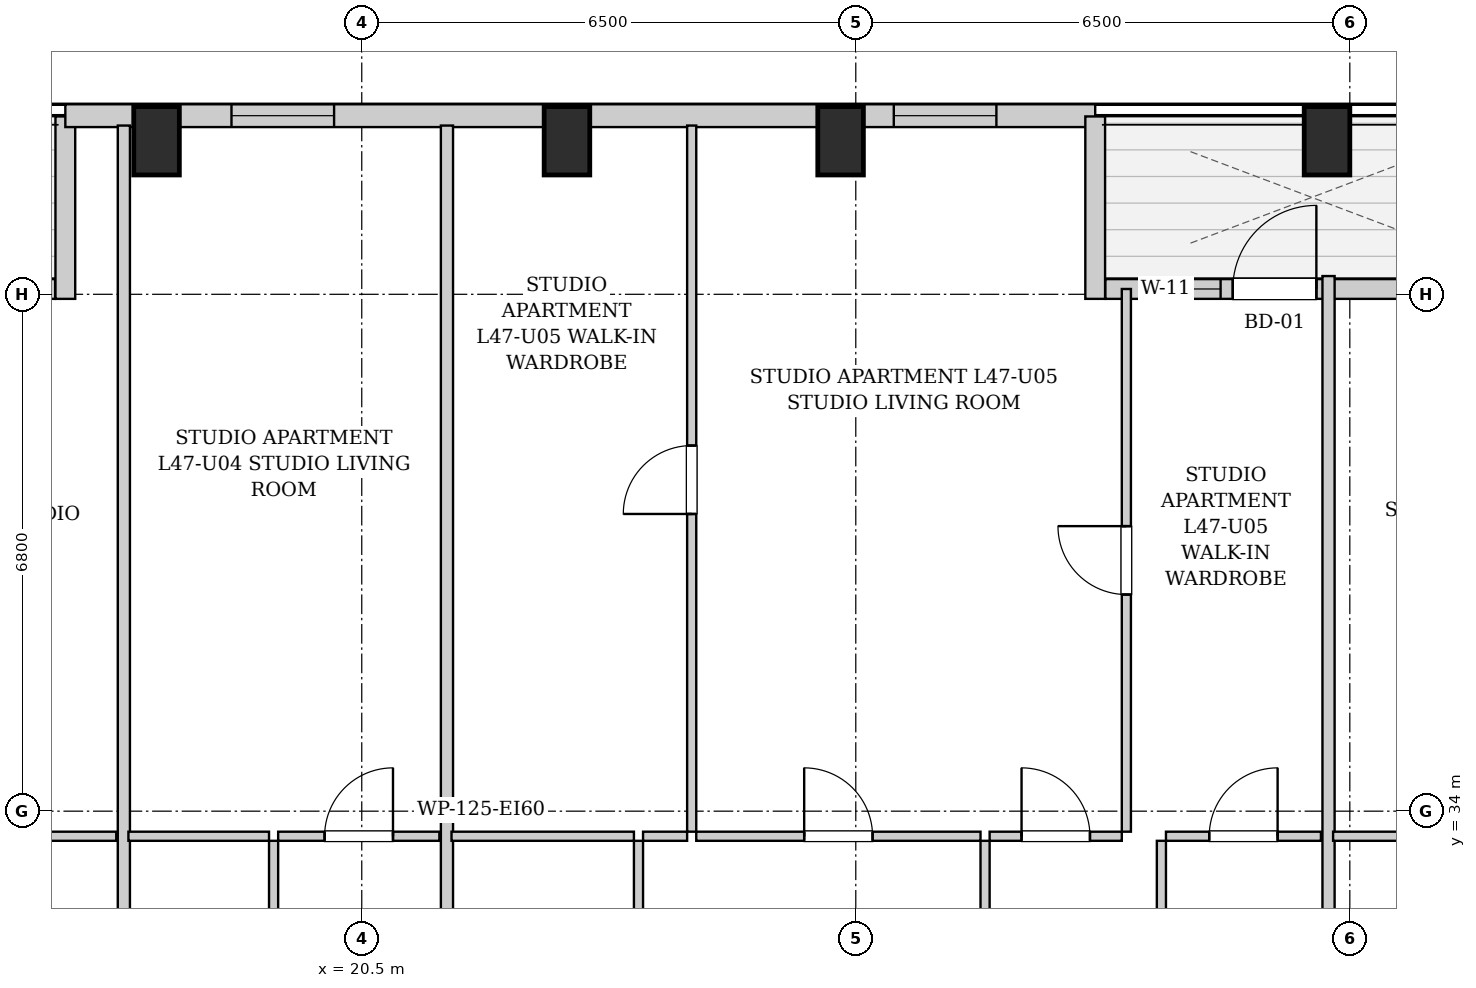
"""IFC4 building model, lengths in metres.
Left out: names, types, materials, properties, quantities, classifications, styles, units other than length and angle.
Written with IfcOpenShell. Run it as: python <this file> out.ifc"""

import sys

from ifc_helpers import new_model, si_unit, direction, frame, frame_2d, origin, origin_2d, place, context, subcontext, project, spatial, rectangle, extrude, element, fill, save


model = new_model("IFC4")
c1 = context("Model", 3, precision=1e-05, world=origin(), true_north=direction((0.0, 1.0)))
c2 = subcontext(c1, "Body", "Model", "MODEL_VIEW")
j1 = project(units=[si_unit("LENGTHUNIT", "METRE"), si_unit("PLANEANGLEUNIT", "RADIAN")], contexts=[c1])
p1 = place(None, origin())
s1 = spatial("IfcSite", under=j1, at=p1, CompositionType="ELEMENT")
p2 = place(p1, origin())
s2 = spatial("IfcBuilding", under=s1, at=p2, CompositionType="ELEMENT")
p3 = place(p2, frame((0.0, 0.0, 163.4)))
s3 = spatial("IfcBuildingStorey", under=s2, at=p3, CompositionType="ELEMENT", Elevation=163.4)
for number, where, z_axis, x_axis in (
    (1, (17.8, 42.82, 0.0), (0.0, 0.0, 1.0), (1.0, 0.0, 0.0)),
    (2, (23.2, 42.82, 0.0), (0.0, 0.0, 1.0), (1.0, 0.0, 0.0)),
    (3, (26.8, 42.82, 0.0), (0.0, 0.0, 1.0), (1.0, 0.0, 0.0)),
    (4, (33.2, 42.82, 0.0), (0.0, 0.0, 1.0), (1.0, 0.0, 0.0)),
):
    element("IfcColumn", number, at=place(p3, frame(where, z_axis=z_axis, x_axis=x_axis)), inside=s3, PredefinedType="COLUMN", context=c2, shape_type="SweptSolid", body=[
        extrude(rectangle(XDim=0.6, YDim=0.9, at=origin_2d()), origin(), (0.0, 0.0, 1.0), 3.25),
    ])
p4 = place(p3, frame((11.434, 40.87, 0.0), z_axis=(0.0, 0.0, 1.0), x_axis=(1.0, 0.0, 0.0)))
e5 = element("IfcWall", 5, at=p4, inside=s3, PredefinedType="SOLIDWALL", context=c2, shape_type="SweptSolid", body=[
    extrude(rectangle(XDim=5.032, YDim=0.26, at=frame_2d((2.516, 0.0))), origin(), (0.0, 0.0, 1.0), 2.99),
])
p5 = place(p4, frame((1.966, 0.0, 0.0)))
e6 = element("IfcOpeningElement", 6, at=p5, cuts=e5, PredefinedType="OPENING", context=c2, shape_type="SweptSolid", body=[
    extrude(rectangle(XDim=1.1, YDim=2.0, at=frame_2d((0.55, 1.0))), frame((0.0, 0.14, 0.0), z_axis=(0.0, -1.0, 0.0), x_axis=(1.0, 0.0, 0.0)), (0.0, 0.0, 1.0), 0.28),
])
p6 = place(p4, frame((3.326, 0.0, 0.85)))
e7 = element("IfcOpeningElement", 7, at=p6, cuts=e5, PredefinedType="OPENING", context=c2, shape_type="SweptSolid", body=[
    extrude(rectangle(XDim=1.35, YDim=1.65, at=frame_2d((0.675, 0.825))), frame((0.0, 0.14, 0.0), z_axis=(0.0, -1.0, 0.0), x_axis=(1.0, 0.0, 0.0)), (0.0, 0.0, 1.0), 0.28),
])
p7 = place(p3, frame((16.6, 40.74, 0.0), z_axis=(0.0, 0.0, 1.0), x_axis=(0.0, 1.0, 0.0)))
e8 = element("IfcWall", 8, at=p7, inside=s3, PredefinedType="SOLIDWALL", context=c2, shape_type="SweptSolid", body=[
    extrude(rectangle(XDim=2.4, YDim=0.26, at=frame_2d((1.2, 0.0))), origin(), (0.0, 0.0, 1.0), 2.99),
])
p8 = place(p3, frame((16.6, 43.15, 0.0), z_axis=(0.0, 0.0, 1.0), x_axis=(1.0, 0.0, 0.0)))
e9 = element("IfcWall", 9, at=p8, inside=s3, PredefinedType="SOLIDWALL", context=c2, shape_type="SweptSolid", body=[
    extrude(rectangle(XDim=13.55, YDim=0.3, at=frame_2d((6.775, 0.0))), origin(), (0.0, 0.0, 1.0), 2.99),
])
p9 = place(p8, frame((2.186, 0.0, 0.55)))
e10 = element("IfcOpeningElement", 10, at=p9, cuts=e9, PredefinedType="OPENING", context=c2, shape_type="SweptSolid", body=[
    extrude(rectangle(XDim=1.35, YDim=1.2, at=frame_2d((0.675, 0.6))), frame((0.0, 0.16, 0.0), z_axis=(0.0, -1.0, 0.0), x_axis=(1.0, 0.0, 0.0)), (0.0, 0.0, 1.0), 0.32),
])
p10 = place(p8, frame((10.9, 0.0, 0.55)))
e11 = element("IfcOpeningElement", 11, at=p10, cuts=e9, PredefinedType="OPENING", context=c2, shape_type="SweptSolid", body=[
    extrude(rectangle(XDim=1.35, YDim=1.2, at=frame_2d((0.675, 0.6))), frame((0.0, 0.16, 0.0), z_axis=(0.0, -1.0, 0.0), x_axis=(1.0, 0.0, 0.0)), (0.0, 0.0, 1.0), 0.32),
])
p11 = place(p3, frame((30.15, 43.14, 0.0), z_axis=(0.0, 0.0, 1.0), x_axis=(0.0, -1.0, 0.0)))
e12 = element("IfcWall", 12, at=p11, inside=s3, PredefinedType="SOLIDWALL", context=c2, shape_type="SweptSolid", body=[
    extrude(rectangle(XDim=2.4, YDim=0.26, at=frame_2d((1.2, 0.0))), origin(), (0.0, 0.0, 1.0), 2.99),
])
p12 = place(p3, frame((30.284, 40.87, 0.0), z_axis=(0.0, 0.0, 1.0), x_axis=(1.0, 0.0, 0.0)))
e13 = element("IfcWall", 13, at=p12, inside=s3, PredefinedType="SOLIDWALL", context=c2, shape_type="SweptSolid", body=[
    extrude(rectangle(XDim=5.432, YDim=0.26, at=frame_2d((2.716, 0.0))), origin(), (0.0, 0.0, 1.0), 2.99),
])
p13 = place(p12, frame((1.676, 0.0, 0.0)))
e14 = element("IfcOpeningElement", 14, at=p13, cuts=e13, PredefinedType="OPENING", context=c2, shape_type="SweptSolid", body=[
    extrude(rectangle(XDim=1.1, YDim=2.0, at=frame_2d((0.55, 1.0))), frame((0.0, 0.14, 0.0), z_axis=(0.0, -1.0, 0.0), x_axis=(1.0, 0.0, 0.0)), (0.0, 0.0, 1.0), 0.28),
])
p14 = place(p12, frame((0.666, 0.0, 0.55)))
e15 = element("IfcOpeningElement", 15, at=p14, cuts=e13, PredefinedType="OPENING", context=c2, shape_type="SweptSolid", body=[
    extrude(rectangle(XDim=0.85, YDim=1.2, at=frame_2d((0.425, 0.6))), frame((0.0, 0.14, 0.0), z_axis=(0.0, -1.0, 0.0), x_axis=(1.0, 0.0, 0.0)), (0.0, 0.0, 1.0), 0.28),
])
p15 = place(p3, frame((12.357, 33.67, 0.0), z_axis=(0.0, 0.0, 1.0), x_axis=(1.0, 0.0, 0.0)))
e16 = element("IfcWall", 16, at=p15, inside=s3, PredefinedType="PARTITIONING", context=c2, shape_type="SweptSolid", body=[
    extrude(rectangle(XDim=4.913, YDim=0.12, at=frame_2d((2.457, 0.0))), origin(), (0.0, 0.0, 1.0), 2.99),
])
p16 = place(p15, frame((2.006, 0.0, 0.0)))
e17 = element("IfcOpeningElement", 17, at=p16, cuts=e16, PredefinedType="OPENING", context=c2, shape_type="SweptSolid", body=[
    extrude(rectangle(XDim=0.9, YDim=2.05, at=frame_2d((0.45, 1.025))), frame((0.0, 0.07, 0.0), z_axis=(0.0, -1.0, 0.0), x_axis=(1.0, 0.0, 0.0)), (0.0, 0.0, 1.0), 0.14),
])
p17 = place(p3, frame((17.37, 30.76, 0.0), z_axis=(0.0, 0.0, 1.0), x_axis=(0.0, 1.0, 0.0)))
e18 = element("IfcWall", 18, at=p17, inside=s3, PredefinedType="PARTITIONING", context=c2, shape_type="SweptSolid", body=[
    extrude(rectangle(XDim=12.26, YDim=0.16, at=frame_2d((6.13, 0.0))), origin(), (0.0, 0.0, 1.0), 2.99),
])
p18 = place(p3, frame((19.34, 30.76, 0.0), z_axis=(0.0, 0.0, 1.0), x_axis=(0.0, 1.0, 0.0)))
e19 = element("IfcWall", 19, at=p18, inside=s3, PredefinedType="PARTITIONING", context=c2, shape_type="SweptSolid", body=[
    extrude(rectangle(XDim=2.85, YDim=0.12, at=frame_2d((1.425, 0.0))), origin(), (0.0, 0.0, 1.0), 2.99),
])
p19 = place(p18, frame((0.995, 0.0, 0.0)))
e20 = element("IfcOpeningElement", 20, at=p19, cuts=e19, PredefinedType="OPENING", context=c2, shape_type="SweptSolid", body=[
    extrude(rectangle(XDim=0.86, YDim=2.05, at=frame_2d((0.43, 1.025))), frame((0.0, 0.07, 0.0), z_axis=(0.0, -1.0, 0.0), x_axis=(1.0, 0.0, 0.0)), (0.0, 0.0, 1.0), 0.14),
])
p20 = place(p3, frame((17.43, 33.67, 0.0), z_axis=(0.0, 0.0, 1.0), x_axis=(1.0, 0.0, 0.0)))
e21 = element("IfcWall", 21, at=p20, inside=s3, PredefinedType="PARTITIONING", context=c2, shape_type="SweptSolid", body=[
    extrude(rectangle(XDim=1.85, YDim=0.12, at=frame_2d((0.925, 0.0))), origin(), (0.0, 0.0, 1.0), 2.99),
])
p21 = place(p3, frame((19.4, 33.67, 0.0), z_axis=(0.0, 0.0, 1.0), x_axis=(1.0, 0.0, 0.0)))
e22 = element("IfcWall", 22, at=p21, inside=s3, PredefinedType="PARTITIONING", context=c2, shape_type="SweptSolid", body=[
    extrude(rectangle(XDim=2.121, YDim=0.12, at=frame_2d((1.061, 0.0))), origin(), (0.0, 0.0, 1.0), 2.99),
])
p22 = place(p21, frame((0.611, 0.0, 0.0)))
e23 = element("IfcOpeningElement", 23, at=p22, cuts=e22, PredefinedType="OPENING", context=c2, shape_type="SweptSolid", body=[
    extrude(rectangle(XDim=0.9, YDim=2.05, at=frame_2d((0.45, 1.025))), frame((0.0, 0.07, 0.0), z_axis=(0.0, -1.0, 0.0), x_axis=(1.0, 0.0, 0.0)), (0.0, 0.0, 1.0), 0.14),
])
p23 = place(p3, frame((21.621, 30.76, 0.0), z_axis=(0.0, 0.0, 1.0), x_axis=(0.0, 1.0, 0.0)))
e24 = element("IfcWall", 24, at=p23, inside=s3, PredefinedType="PARTITIONING", context=c2, shape_type="SweptSolid", body=[
    extrude(rectangle(XDim=12.26, YDim=0.16, at=frame_2d((6.13, 0.0))), origin(), (0.0, 0.0, 1.0), 2.99),
])
p24 = place(p3, frame((24.141, 30.76, 0.0), z_axis=(0.0, 0.0, 1.0), x_axis=(0.0, 1.0, 0.0)))
e25 = element("IfcWall", 25, at=p24, inside=s3, PredefinedType="PARTITIONING", context=c2, shape_type="SweptSolid", body=[
    extrude(rectangle(XDim=2.85, YDim=0.12, at=frame_2d((1.425, 0.0))), origin(), (0.0, 0.0, 1.0), 2.99),
])
p25 = place(p24, frame((0.995, 0.0, 0.0)))
e26 = element("IfcOpeningElement", 26, at=p25, cuts=e25, PredefinedType="OPENING", context=c2, shape_type="SweptSolid", body=[
    extrude(rectangle(XDim=0.86, YDim=2.05, at=frame_2d((0.43, 1.025))), frame((0.0, 0.07, 0.0), z_axis=(0.0, -1.0, 0.0), x_axis=(1.0, 0.0, 0.0)), (0.0, 0.0, 1.0), 0.14),
])
p26 = place(p3, frame((21.681, 33.67, 0.0), z_axis=(0.0, 0.0, 1.0), x_axis=(1.0, 0.0, 0.0)))
e27 = element("IfcWall", 27, at=p26, inside=s3, PredefinedType="PARTITIONING", context=c2, shape_type="SweptSolid", body=[
    extrude(rectangle(XDim=2.4, YDim=0.12, at=frame_2d((1.2, 0.0))), origin(), (0.0, 0.0, 1.0), 2.99),
])
p27 = place(p3, frame((28.701, 30.76, 0.0), z_axis=(0.0, 0.0, 1.0), x_axis=(0.0, 1.0, 0.0)))
e28 = element("IfcWall", 28, at=p27, inside=s3, PredefinedType="PARTITIONING", context=c2, shape_type="SweptSolid", body=[
    extrude(rectangle(XDim=2.85, YDim=0.12, at=frame_2d((1.425, 0.0))), origin(), (0.0, 0.0, 1.0), 2.99),
])
p28 = place(p27, frame((0.975, 0.0, 0.0)))
e29 = element("IfcOpeningElement", 29, at=p28, cuts=e28, PredefinedType="OPENING", context=c2, shape_type="SweptSolid", body=[
    extrude(rectangle(XDim=0.9, YDim=2.05, at=frame_2d((0.45, 1.025))), frame((0.0, 0.07, 0.0), z_axis=(0.0, -1.0, 0.0), x_axis=(1.0, 0.0, 0.0)), (0.0, 0.0, 1.0), 0.14),
])
p29 = place(p3, frame((24.201, 33.67, 0.0), z_axis=(0.0, 0.0, 1.0), x_axis=(1.0, 0.0, 0.0)))
e30 = element("IfcWall", 30, at=p29, inside=s3, PredefinedType="PARTITIONING", context=c2, shape_type="SweptSolid", body=[
    extrude(rectangle(XDim=0.58, YDim=0.12, at=frame_2d((0.29, 0.0))), origin(), (0.0, 0.0, 1.0), 2.99),
])
p30 = place(p3, frame((24.901, 33.67, 0.0), z_axis=(0.0, 0.0, 1.0), x_axis=(1.0, 0.0, 0.0)))
e31 = element("IfcWall", 31, at=p30, inside=s3, PredefinedType="PARTITIONING", context=c2, shape_type="SweptSolid", body=[
    extrude(rectangle(XDim=3.74, YDim=0.12, at=frame_2d((1.87, 0.0))), origin(), (0.0, 0.0, 1.0), 2.99),
])
p31 = place(p30, frame((1.42, 0.0, 0.0)))
e32 = element("IfcOpeningElement", 32, at=p31, cuts=e31, PredefinedType="OPENING", context=c2, shape_type="SweptSolid", body=[
    extrude(rectangle(XDim=0.9, YDim=2.05, at=frame_2d((0.45, 1.025))), frame((0.0, 0.07, 0.0), z_axis=(0.0, -1.0, 0.0), x_axis=(1.0, 0.0, 0.0)), (0.0, 0.0, 1.0), 0.14),
])
p32 = place(p3, frame((31.021, 30.76, 0.0), z_axis=(0.0, 0.0, 1.0), x_axis=(0.0, 1.0, 0.0)))
e33 = element("IfcWall", 33, at=p32, inside=s3, PredefinedType="PARTITIONING", context=c2, shape_type="SweptSolid", body=[
    extrude(rectangle(XDim=2.85, YDim=0.12, at=frame_2d((1.425, 0.0))), origin(), (0.0, 0.0, 1.0), 2.99),
])
p33 = place(p32, frame((0.975, 0.0, 0.0)))
e34 = element("IfcOpeningElement", 34, at=p33, cuts=e33, PredefinedType="OPENING", context=c2, shape_type="SweptSolid", body=[
    extrude(rectangle(XDim=0.9, YDim=2.05, at=frame_2d((0.45, 1.025))), frame((0.0, 0.07, 0.0), z_axis=(0.0, -1.0, 0.0), x_axis=(1.0, 0.0, 0.0)), (0.0, 0.0, 1.0), 0.14),
])
p34 = place(p3, frame((28.761, 33.67, 0.0), z_axis=(0.0, 0.0, 1.0), x_axis=(1.0, 0.0, 0.0)))
e35 = element("IfcWall", 35, at=p34, inside=s3, PredefinedType="PARTITIONING", context=c2, shape_type="SweptSolid", body=[
    extrude(rectangle(XDim=1.739, YDim=0.12, at=frame_2d((0.87, 0.0))), origin(), (0.0, 0.0, 1.0), 2.99),
])
p35 = place(p34, frame((0.42, 0.0, 0.0)))
e36 = element("IfcOpeningElement", 36, at=p35, cuts=e35, PredefinedType="OPENING", context=c2, shape_type="SweptSolid", body=[
    extrude(rectangle(XDim=0.9, YDim=2.05, at=frame_2d((0.45, 1.025))), frame((0.0, 0.07, 0.0), z_axis=(0.0, -1.0, 0.0), x_axis=(1.0, 0.0, 0.0)), (0.0, 0.0, 1.0), 0.14),
])
p36 = place(p3, frame((31.081, 33.67, 0.0), z_axis=(0.0, 0.0, 1.0), x_axis=(1.0, 0.0, 0.0)))
e37 = element("IfcWall", 37, at=p36, inside=s3, PredefinedType="PARTITIONING", context=c2, shape_type="SweptSolid", body=[
    extrude(rectangle(XDim=2.039, YDim=0.12, at=frame_2d((1.02, 0.0))), origin(), (0.0, 0.0, 1.0), 2.99),
])
p37 = place(p36, frame((0.569, 0.0, 0.0)))
e38 = element("IfcOpeningElement", 38, at=p37, cuts=e37, PredefinedType="OPENING", context=c2, shape_type="SweptSolid", body=[
    extrude(rectangle(XDim=0.9, YDim=2.05, at=frame_2d((0.45, 1.025))), frame((0.0, 0.07, 0.0), z_axis=(0.0, -1.0, 0.0), x_axis=(1.0, 0.0, 0.0)), (0.0, 0.0, 1.0), 0.14),
])
p38 = place(p3, frame((24.841, 33.73, 0.0), z_axis=(0.0, 0.0, 1.0), x_axis=(0.0, 1.0, 0.0)))
e39 = element("IfcWall", 39, at=p38, inside=s3, PredefinedType="PARTITIONING", context=c2, shape_type="SweptSolid", body=[
    extrude(rectangle(XDim=9.29, YDim=0.12, at=frame_2d((4.645, 0.0))), origin(), (0.0, 0.0, 1.0), 2.99),
])
p39 = place(p38, frame((4.18, 0.0, 0.0)))
e40 = element("IfcOpeningElement", 40, at=p39, cuts=e39, PredefinedType="OPENING", context=c2, shape_type="SweptSolid", body=[
    extrude(rectangle(XDim=0.9, YDim=2.05, at=frame_2d((0.45, 1.025))), frame((0.0, 0.07, 0.0), z_axis=(0.0, -1.0, 0.0), x_axis=(1.0, 0.0, 0.0)), (0.0, 0.0, 1.0), 0.14),
])
p40 = place(p3, frame((30.56, 33.73, 0.0), z_axis=(0.0, 0.0, 1.0), x_axis=(0.0, 1.0, 0.0)))
e41 = element("IfcWall", 41, at=p40, inside=s3, PredefinedType="PARTITIONING", context=c2, shape_type="SweptSolid", body=[
    extrude(rectangle(XDim=7.14, YDim=0.12, at=frame_2d((3.57, 0.0))), origin(), (0.0, 0.0, 1.0), 2.99),
])
p41 = place(p40, frame((3.12, 0.0, 0.0)))
e42 = element("IfcOpeningElement", 42, at=p41, cuts=e41, PredefinedType="OPENING", context=c2, shape_type="SweptSolid", body=[
    extrude(rectangle(XDim=0.9, YDim=2.05, at=frame_2d((0.45, 1.025))), frame((0.0, 0.07, 0.0), z_axis=(0.0, -1.0, 0.0), x_axis=(1.0, 0.0, 0.0)), (0.0, 0.0, 1.0), 0.14),
])
p42 = place(p3, frame((33.22, 30.76, 0.0), z_axis=(0.0, 0.0, 1.0), x_axis=(0.0, 1.0, 0.0)))
e43 = element("IfcWall", 43, at=p42, inside=s3, PredefinedType="PARTITIONING", context=c2, shape_type="SweptSolid", body=[
    extrude(rectangle(XDim=10.28, YDim=0.16, at=frame_2d((5.14, 0.0))), origin(), (0.0, 0.0, 1.0), 2.442),
])
p43 = place(p3, frame((33.28, 33.67, 0.0), z_axis=(0.0, 0.0, 1.0), x_axis=(1.0, 0.0, 0.0)))
e44 = element("IfcWall", 44, at=p43, inside=s3, PredefinedType="PARTITIONING", context=c2, shape_type="SweptSolid", body=[
    extrude(rectangle(XDim=1.85, YDim=0.12, at=frame_2d((0.925, 0.0))), origin(), (0.0, 0.0, 1.0), 2.99),
])
p44 = place(p22, origin())
e45 = element("IfcDoor", 45, at=p44, inside=s3, OperationType="SINGLE_SWING_RIGHT", PredefinedType="DOOR", context=c2, shape_type="SweptSolid", body=[
    extrude(rectangle(XDim=0.9, YDim=2.05, at=frame_2d((0.45, 1.025))), frame((0.0, 0.025, 0.0), z_axis=(0.0, -1.0, 0.0), x_axis=(1.0, 0.0, 0.0)), (0.0, 0.0, 1.0), 0.05),
])
fill(e23, e45)
p45 = place(p31, origin())
e46 = element("IfcDoor", 46, at=p45, inside=s3, OperationType="SINGLE_SWING_LEFT", PredefinedType="DOOR", context=c2, shape_type="SweptSolid", body=[
    extrude(rectangle(XDim=0.9, YDim=2.05, at=frame_2d((0.45, 1.025))), frame((0.0, 0.025, 0.0), z_axis=(0.0, -1.0, 0.0), x_axis=(1.0, 0.0, 0.0)), (0.0, 0.0, 1.0), 0.05),
])
fill(e32, e46)
p46 = place(p35, origin())
e47 = element("IfcDoor", 47, at=p46, inside=s3, OperationType="SINGLE_SWING_LEFT", PredefinedType="DOOR", context=c2, shape_type="SweptSolid", body=[
    extrude(rectangle(XDim=0.9, YDim=2.05, at=frame_2d((0.45, 1.025))), frame((0.0, 0.025, 0.0), z_axis=(0.0, -1.0, 0.0), x_axis=(1.0, 0.0, 0.0)), (0.0, 0.0, 1.0), 0.05),
])
fill(e36, e47)
p47 = place(p37, origin())
e48 = element("IfcDoor", 48, at=p47, inside=s3, OperationType="SINGLE_SWING_RIGHT", PredefinedType="DOOR", context=c2, shape_type="SweptSolid", body=[
    extrude(rectangle(XDim=0.9, YDim=2.05, at=frame_2d((0.45, 1.025))), frame((0.0, 0.025, 0.0), z_axis=(0.0, -1.0, 0.0), x_axis=(1.0, 0.0, 0.0)), (0.0, 0.0, 1.0), 0.05),
])
fill(e38, e48)
p48 = place(p39, origin())
e49 = element("IfcDoor", 49, at=p48, inside=s3, OperationType="SINGLE_SWING_LEFT", PredefinedType="DOOR", context=c2, shape_type="SweptSolid", body=[
    extrude(rectangle(XDim=0.9, YDim=2.05, at=frame_2d((0.45, 1.025))), frame((0.0, 0.025, 0.0), z_axis=(0.0, -1.0, 0.0), x_axis=(1.0, 0.0, 0.0)), (0.0, 0.0, 1.0), 0.05),
])
fill(e40, e49)
p49 = place(p41, origin())
e50 = element("IfcDoor", 50, at=p49, inside=s3, OperationType="SINGLE_SWING_RIGHT", PredefinedType="DOOR", context=c2, shape_type="SweptSolid", body=[
    extrude(rectangle(XDim=0.9, YDim=2.05, at=frame_2d((0.45, 1.025))), frame((0.0, 0.025, 0.0), z_axis=(0.0, -1.0, 0.0), x_axis=(1.0, 0.0, 0.0)), (0.0, 0.0, 1.0), 0.05),
])
fill(e42, e50)
p50 = place(p13, origin())
e51 = element("IfcDoor", 51, at=p50, inside=s3, OperationType="SINGLE_SWING_RIGHT", PredefinedType="DOOR", context=c2, shape_type="SweptSolid", body=[
    extrude(rectangle(XDim=1.1, YDim=2.0, at=frame_2d((0.55, 1.0))), frame((0.0, 0.025, 0.0), z_axis=(0.0, -1.0, 0.0), x_axis=(1.0, 0.0, 0.0)), (0.0, 0.0, 1.0), 0.05),
])
fill(e14, e51)
p51 = place(p9, origin())
e52 = element("IfcWindow", 52, at=p51, inside=s3, PartitioningType="SINGLE_PANEL", PredefinedType="WINDOW", context=c2, shape_type="SweptSolid", body=[
    extrude(rectangle(XDim=1.35, YDim=1.2, at=frame_2d((0.675, 0.6))), frame((0.0, 0.03, 0.0), z_axis=(0.0, -1.0, 0.0), x_axis=(1.0, 0.0, 0.0)), (0.0, 0.0, 1.0), 0.06),
])
fill(e10, e52)
p52 = place(p10, origin())
e53 = element("IfcWindow", 53, at=p52, inside=s3, PartitioningType="SINGLE_PANEL", PredefinedType="WINDOW", context=c2, shape_type="SweptSolid", body=[
    extrude(rectangle(XDim=1.35, YDim=1.2, at=frame_2d((0.675, 0.6))), frame((0.0, 0.03, 0.0), z_axis=(0.0, -1.0, 0.0), x_axis=(1.0, 0.0, 0.0)), (0.0, 0.0, 1.0), 0.06),
])
fill(e11, e53)
p53 = place(p14, origin())
e54 = element("IfcWindow", 54, at=p53, inside=s3, PartitioningType="SINGLE_PANEL", PredefinedType="WINDOW", context=c2, shape_type="SweptSolid", body=[
    extrude(rectangle(XDim=0.85, YDim=1.2, at=frame_2d((0.425, 0.6))), frame((0.0, 0.03, 0.0), z_axis=(0.0, -1.0, 0.0), x_axis=(1.0, 0.0, 0.0)), (0.0, 0.0, 1.0), 0.06),
])
fill(e15, e54)
save(model, sys.argv[1])
